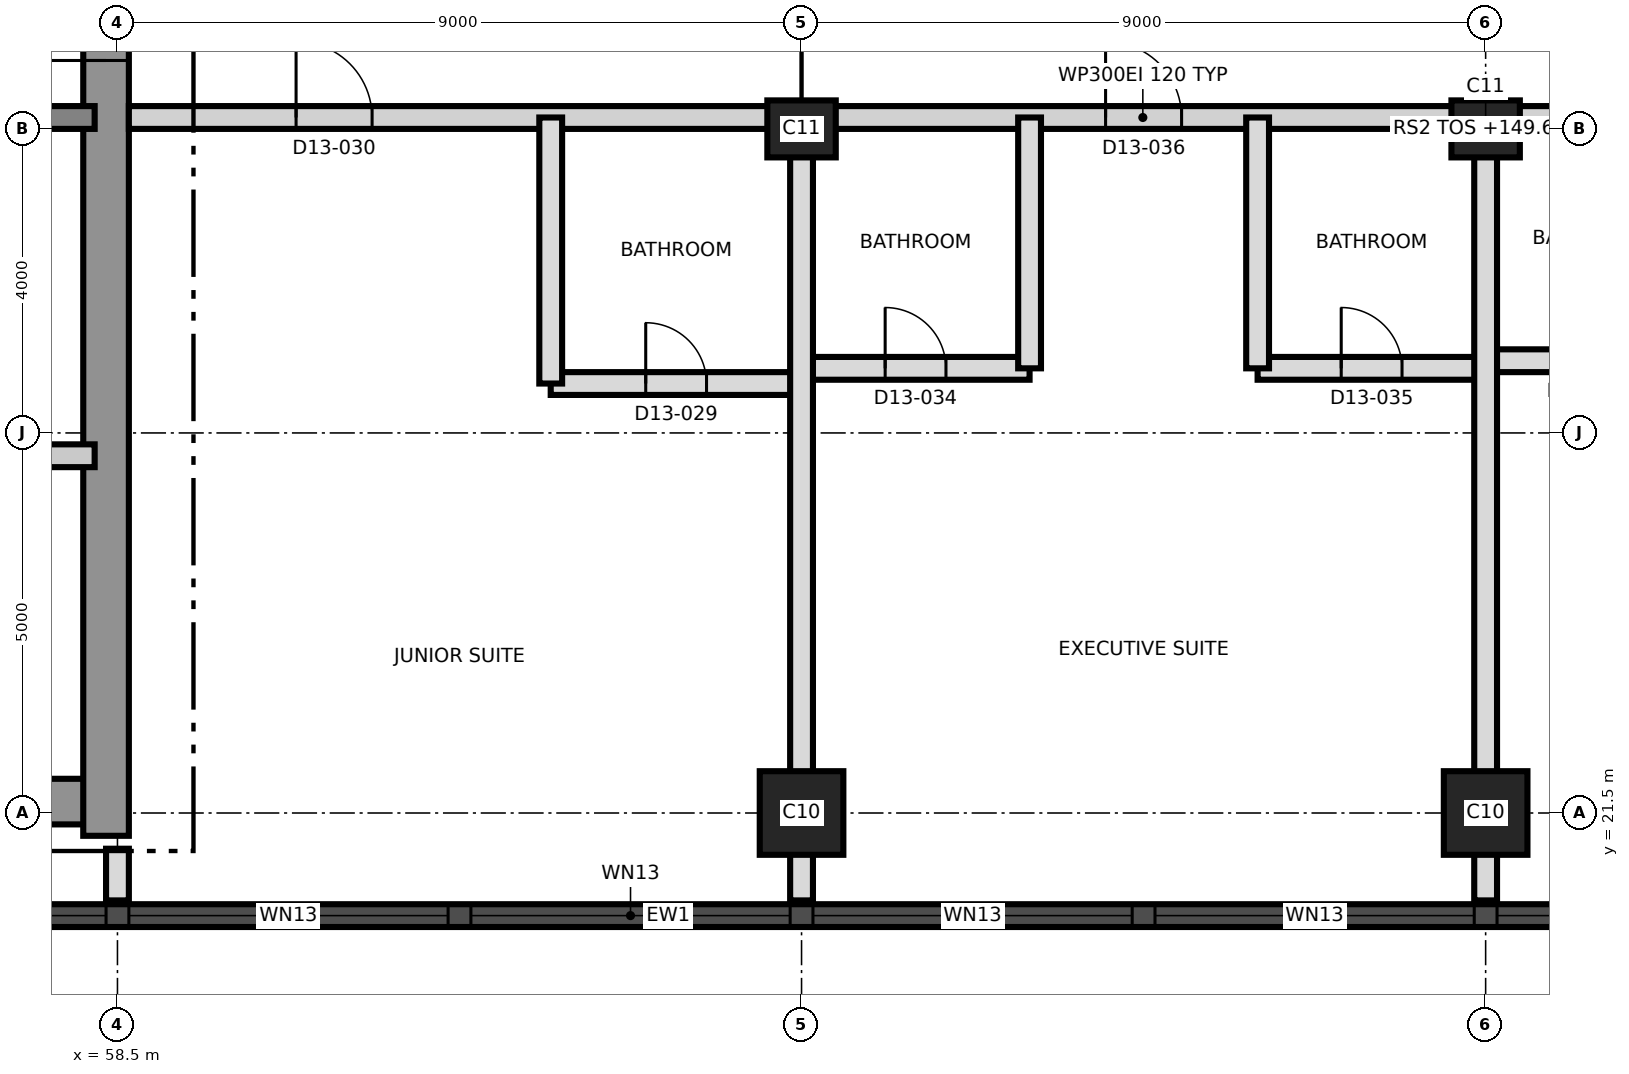
"""IFC4 building model, lengths in metres.
Left out: names, types, materials, properties, quantities, classifications, styles, units other than length and angle.
Written with IfcOpenShell. Run it as: python <this file> out.ifc"""

import sys

from ifc_helpers import new_model, si_unit, direction, frame, frame_2d, origin, origin_2d, place, context, subcontext, project, spatial, rectangle, extrude, element, fill, save


model = new_model("IFC4")
c1 = context("Model", 3, precision=1e-05, world=origin(), true_north=direction((0.0, 1.0)))
c2 = subcontext(c1, "Body", "Model", "MODEL_VIEW")
j1 = project(units=[si_unit("LENGTHUNIT", "METRE"), si_unit("PLANEANGLEUNIT", "RADIAN")], contexts=[c1])
p1 = place(None, origin())
s1 = spatial("IfcSite", under=j1, at=p1, CompositionType="ELEMENT")
p2 = place(p1, origin())
s2 = spatial("IfcBuilding", under=s1, at=p2, CompositionType="ELEMENT")
p3 = place(p2, frame((0.0, 0.0, 145.9)))
s3 = spatial("IfcBuildingStorey", under=s2, at=p3, CompositionType="ELEMENT", Elevation=145.9)
p4 = place(p3, frame((31.2, 21.65, 0.0), z_axis=(0.0, 0.0, 1.0), x_axis=(1.0, 0.0, 0.0)))
e1 = element("IfcWall", 1, at=p4, inside=s3, PredefinedType="SHEAR", context=c2, shape_type="SweptSolid", body=[
    extrude(rectangle(XDim=27.0, YDim=0.6, at=frame_2d((13.5, 0.0))), origin(), (0.0, 0.0, 1.0), 3.7),
])
p5 = place(p3, frame((58.35, 21.2, 0.0), z_axis=(0.0, 0.0, 1.0), x_axis=(0.0, 1.0, 0.0)))
e2 = element("IfcWall", 2, at=p5, inside=s3, PredefinedType="SHEAR", context=c2, shape_type="SweptSolid", body=[
    extrude(rectangle(XDim=18.6, YDim=0.6, at=frame_2d((9.3, 0.0))), origin(), (0.0, 0.0, 1.0), 3.7),
])
p6 = place(p5, frame((10.2, 0.0, 0.0)))
e3 = element("IfcOpeningElement", 3, at=p6, cuts=e2, PredefinedType="OPENING", context=c2, shape_type="SweptSolid", body=[
    extrude(rectangle(XDim=1.2, YDim=2.1, at=frame_2d((0.6, 1.05))), frame((0.0, 0.31, 0.0), z_axis=(0.0, -1.0, 0.0), x_axis=(1.0, 0.0, 0.0)), (0.0, 0.0, 1.0), 0.62),
])
p7 = place(p3, frame((31.8, 30.65, 0.0), z_axis=(0.0, 0.0, 1.0), x_axis=(1.0, 0.0, 0.0)))
e4 = element("IfcWall", 4, at=p7, inside=s3, PredefinedType="SHEAR", context=c2, shape_type="SweptSolid", body=[
    extrude(rectangle(XDim=26.4, YDim=0.3, at=frame_2d((13.2, 0.0))), origin(), (0.0, 0.0, 1.0), 3.7),
])
p8 = place(p7, frame((24.7, 0.0, 0.0)))
e5 = element("IfcOpeningElement", 5, at=p8, cuts=e4, PredefinedType="OPENING", context=c2, shape_type="SweptSolid", body=[
    extrude(rectangle(XDim=1.0, YDim=2.1, at=frame_2d((0.5, 1.05))), frame((0.0, 0.16, 0.0), z_axis=(0.0, -1.0, 0.0), x_axis=(1.0, 0.0, 0.0)), (0.0, 0.0, 1.0), 0.32),
])
p9 = place(p7, frame((4.0, 0.0, 0.0)))
e6 = element("IfcOpeningElement", 6, at=p9, cuts=e4, PredefinedType="OPENING", context=c2, shape_type="SweptSolid", body=[
    extrude(rectangle(XDim=1.0, YDim=2.1, at=frame_2d((0.5, 1.05))), frame((0.0, 0.16, 0.0), z_axis=(0.0, -1.0, 0.0), x_axis=(1.0, 0.0, 0.0)), (0.0, 0.0, 1.0), 0.32),
])
for number, where, z_axis, x_axis in (
    (7, (67.5, 21.5, 0.0), (0.0, 0.0, 1.0), (1.0, 0.0, 0.0)),
    (8, (76.5, 21.5, 0.0), (0.0, 0.0, 1.0), (1.0, 0.0, 0.0)),
):
    element("IfcColumn", number, at=place(p3, frame(where, z_axis=z_axis, x_axis=x_axis)), inside=s3, PredefinedType="COLUMN", context=c2, shape_type="SweptSolid", body=[
        extrude(rectangle(XDim=1.1, YDim=1.1, at=origin_2d()), origin(), (0.0, 0.0, 1.0), 3.7),
    ])
for number, where, z_axis, x_axis in (
    (9, (67.5, 30.5, 0.0), (0.0, 0.0, 1.0), (1.0, 0.0, 0.0)),
    (10, (76.5, 30.5, 0.0), (0.0, 0.0, 1.0), (1.0, 0.0, 0.0)),
):
    element("IfcColumn", number, at=place(p3, frame(where, z_axis=z_axis, x_axis=x_axis)), inside=s3, PredefinedType="COLUMN", context=c2, shape_type="SweptSolid", body=[
        extrude(rectangle(XDim=0.9, YDim=0.75, at=origin_2d()), origin(), (0.0, 0.0, 1.0), 3.7),
    ])
p10 = place(p3, frame((44.011, 20.15, 0.0), z_axis=(0.0, 0.0, 1.0), x_axis=(1.0, 0.0, 0.0)))
e11 = element("IfcWall", 11, at=p10, inside=s3, PredefinedType="SOLIDWALL", context=c2, shape_type="SweptSolid", body=[
    extrude(rectangle(XDim=43.476, YDim=0.3, at=frame_2d((21.738, 0.0))), origin(), (0.0, 0.0, 1.0), 3.4),
])
p11 = place(p10, frame((1.845, 0.0, 0.3)))
e12 = element("IfcOpeningElement", 12, at=p11, cuts=e11, PredefinedType="OPENING", context=c2, shape_type="SweptSolid", body=[
    extrude(rectangle(XDim=1.8, YDim=2.4, at=frame_2d((0.9, 1.2))), frame((0.0, 0.16, 0.0), z_axis=(0.0, -1.0, 0.0), x_axis=(1.0, 0.0, 0.0)), (0.0, 0.0, 1.0), 0.32),
])
p12 = place(p10, frame((5.639, 0.0, 0.9)))
e13 = element("IfcOpeningElement", 13, at=p12, cuts=e11, PredefinedType="OPENING", context=c2, shape_type="SweptSolid", body=[
    extrude(rectangle(XDim=4.2, YDim=1.7, at=frame_2d((2.1, 0.85))), frame((0.0, 0.16, 0.0), z_axis=(0.0, -1.0, 0.0), x_axis=(1.0, 0.0, 0.0)), (0.0, 0.0, 1.0), 0.32),
])
p13 = place(p10, frame((10.139, 0.0, 0.9)))
e14 = element("IfcOpeningElement", 14, at=p13, cuts=e11, PredefinedType="OPENING", context=c2, shape_type="SweptSolid", body=[
    extrude(rectangle(XDim=4.2, YDim=1.7, at=frame_2d((2.1, 0.85))), frame((0.0, 0.16, 0.0), z_axis=(0.0, -1.0, 0.0), x_axis=(1.0, 0.0, 0.0)), (0.0, 0.0, 1.0), 0.32),
])
p14 = place(p10, frame((14.639, 0.0, 0.9)))
e15 = element("IfcOpeningElement", 15, at=p14, cuts=e11, PredefinedType="OPENING", context=c2, shape_type="SweptSolid", body=[
    extrude(rectangle(XDim=4.2, YDim=1.7, at=frame_2d((2.1, 0.85))), frame((0.0, 0.16, 0.0), z_axis=(0.0, -1.0, 0.0), x_axis=(1.0, 0.0, 0.0)), (0.0, 0.0, 1.0), 0.32),
])
p15 = place(p10, frame((19.139, 0.0, 0.9)))
e16 = element("IfcOpeningElement", 16, at=p15, cuts=e11, PredefinedType="OPENING", context=c2, shape_type="SweptSolid", body=[
    extrude(rectangle(XDim=4.2, YDim=1.7, at=frame_2d((2.1, 0.85))), frame((0.0, 0.16, 0.0), z_axis=(0.0, -1.0, 0.0), x_axis=(1.0, 0.0, 0.0)), (0.0, 0.0, 1.0), 0.32),
])
p16 = place(p10, frame((23.639, 0.0, 0.9)))
e17 = element("IfcOpeningElement", 17, at=p16, cuts=e11, PredefinedType="OPENING", context=c2, shape_type="SweptSolid", body=[
    extrude(rectangle(XDim=4.2, YDim=1.7, at=frame_2d((2.1, 0.85))), frame((0.0, 0.16, 0.0), z_axis=(0.0, -1.0, 0.0), x_axis=(1.0, 0.0, 0.0)), (0.0, 0.0, 1.0), 0.32),
])
p17 = place(p10, frame((28.139, 0.0, 0.9)))
e18 = element("IfcOpeningElement", 18, at=p17, cuts=e11, PredefinedType="OPENING", context=c2, shape_type="SweptSolid", body=[
    extrude(rectangle(XDim=4.2, YDim=1.7, at=frame_2d((2.1, 0.85))), frame((0.0, 0.16, 0.0), z_axis=(0.0, -1.0, 0.0), x_axis=(1.0, 0.0, 0.0)), (0.0, 0.0, 1.0), 0.32),
])
p18 = place(p10, frame((32.639, 0.0, 0.9)))
e19 = element("IfcOpeningElement", 19, at=p18, cuts=e11, PredefinedType="OPENING", context=c2, shape_type="SweptSolid", body=[
    extrude(rectangle(XDim=4.2, YDim=1.7, at=frame_2d((2.1, 0.85))), frame((0.0, 0.16, 0.0), z_axis=(0.0, -1.0, 0.0), x_axis=(1.0, 0.0, 0.0)), (0.0, 0.0, 1.0), 0.32),
])
p19 = place(p10, frame((37.139, 0.0, 0.9)))
e20 = element("IfcOpeningElement", 20, at=p19, cuts=e11, PredefinedType="OPENING", context=c2, shape_type="SweptSolid", body=[
    extrude(rectangle(XDim=4.2, YDim=1.7, at=frame_2d((2.1, 0.85))), frame((0.0, 0.16, 0.0), z_axis=(0.0, -1.0, 0.0), x_axis=(1.0, 0.0, 0.0)), (0.0, 0.0, 1.0), 0.32),
])
p20 = place(p3, frame((55.8, 26.2, 0.0), z_axis=(0.0, 0.0, 1.0), x_axis=(1.0, 0.0, 0.0)))
e21 = element("IfcWall", 21, at=p20, inside=s3, PredefinedType="PARTITIONING", context=c2, shape_type="SweptSolid", body=[
    extrude(rectangle(XDim=2.4, YDim=0.3, at=frame_2d((1.2, 0.0))), origin(), (0.0, 0.0, 1.0), 3.4),
])
p21 = place(p20, frame((0.75, 0.0, 0.0)))
e22 = element("IfcOpeningElement", 22, at=p21, cuts=e21, PredefinedType="OPENING", context=c2, shape_type="SweptSolid", body=[
    extrude(rectangle(XDim=0.9, YDim=2.1, at=frame_2d((0.45, 1.05))), frame((0.0, 0.16, 0.0), z_axis=(0.0, -1.0, 0.0), x_axis=(1.0, 0.0, 0.0)), (0.0, 0.0, 1.0), 0.32),
])
p22 = place(p3, frame((64.2, 27.15, 0.0), z_axis=(0.0, 0.0, 1.0), x_axis=(1.0, 0.0, 0.0)))
e23 = element("IfcWall", 23, at=p22, inside=s3, PredefinedType="PARTITIONING", context=c2, shape_type="SweptSolid", body=[
    extrude(rectangle(XDim=3.3, YDim=0.3, at=frame_2d((1.65, 0.0))), origin(), (0.0, 0.0, 1.0), 3.3),
])
p23 = place(p22, frame((1.25, 0.0, 0.0)))
e24 = element("IfcOpeningElement", 24, at=p23, cuts=e23, PredefinedType="OPENING", context=c2, shape_type="SweptSolid", body=[
    extrude(rectangle(XDim=0.8, YDim=2.1, at=frame_2d((0.4, 1.05))), frame((0.0, 0.16, 0.0), z_axis=(0.0, -1.0, 0.0), x_axis=(1.0, 0.0, 0.0)), (0.0, 0.0, 1.0), 0.32),
])
p24 = place(p3, frame((67.5, 27.35, 0.0), z_axis=(0.0, 0.0, 1.0), x_axis=(1.0, 0.0, 0.0)))
e25 = element("IfcWall", 25, at=p24, inside=s3, PredefinedType="PARTITIONING", context=c2, shape_type="SweptSolid", body=[
    extrude(rectangle(XDim=3.0, YDim=0.3, at=frame_2d((1.5, 0.0))), origin(), (0.0, 0.0, 1.0), 3.3),
])
p25 = place(p24, frame((1.1, 0.0, 0.0)))
e26 = element("IfcOpeningElement", 26, at=p25, cuts=e25, PredefinedType="OPENING", context=c2, shape_type="SweptSolid", body=[
    extrude(rectangle(XDim=0.8, YDim=2.1, at=frame_2d((0.4, 1.05))), frame((0.0, 0.16, 0.0), z_axis=(0.0, -1.0, 0.0), x_axis=(1.0, 0.0, 0.0)), (0.0, 0.0, 1.0), 0.32),
])
p26 = place(p3, frame((73.5, 27.35, 0.0), z_axis=(0.0, 0.0, 1.0), x_axis=(1.0, 0.0, 0.0)))
e27 = element("IfcWall", 27, at=p26, inside=s3, PredefinedType="PARTITIONING", context=c2, shape_type="SweptSolid", body=[
    extrude(rectangle(XDim=3.0, YDim=0.3, at=frame_2d((1.5, 0.0))), origin(), (0.0, 0.0, 1.0), 3.3),
])
p27 = place(p26, frame((1.1, 0.0, 0.0)))
e28 = element("IfcOpeningElement", 28, at=p27, cuts=e27, PredefinedType="OPENING", context=c2, shape_type="SweptSolid", body=[
    extrude(rectangle(XDim=0.8, YDim=2.1, at=frame_2d((0.4, 1.05))), frame((0.0, 0.16, 0.0), z_axis=(0.0, -1.0, 0.0), x_axis=(1.0, 0.0, 0.0)), (0.0, 0.0, 1.0), 0.32),
])
p28 = place(p3, frame((76.5, 27.45, 0.0), z_axis=(0.0, 0.0, 1.0), x_axis=(1.0, 0.0, 0.0)))
e29 = element("IfcWall", 29, at=p28, inside=s3, PredefinedType="PARTITIONING", context=c2, shape_type="SweptSolid", body=[
    extrude(rectangle(XDim=2.7, YDim=0.3, at=frame_2d((1.35, 0.0))), origin(), (0.0, 0.0, 1.0), 3.3),
])
p29 = place(p28, frame((0.95, 0.0, 0.0)))
e30 = element("IfcOpeningElement", 30, at=p29, cuts=e29, PredefinedType="OPENING", context=c2, shape_type="SweptSolid", body=[
    extrude(rectangle(XDim=0.8, YDim=2.1, at=frame_2d((0.4, 1.05))), frame((0.0, 0.16, 0.0), z_axis=(0.0, -1.0, 0.0), x_axis=(1.0, 0.0, 0.0)), (0.0, 0.0, 1.0), 0.32),
])
p30 = place(p3, frame((58.65, 30.65, 0.0), z_axis=(0.0, 0.0, 1.0), x_axis=(1.0, 0.0, 0.0)))
e31 = element("IfcWall", 31, at=p30, inside=s3, PredefinedType="PARTITIONING", context=c2, shape_type="SweptSolid", body=[
    extrude(rectangle(XDim=26.68, YDim=0.3, at=frame_2d((13.34, 0.0))), origin(), (0.0, 0.0, 1.0), 3.3),
])
p31 = place(p30, frame((2.2, 0.0, 0.0)))
e32 = element("IfcOpeningElement", 32, at=p31, cuts=e31, PredefinedType="OPENING", context=c2, shape_type="SweptSolid", body=[
    extrude(rectangle(XDim=1.0, YDim=2.4, at=frame_2d((0.5, 1.2))), frame((0.0, 0.16, 0.0), z_axis=(0.0, -1.0, 0.0), x_axis=(1.0, 0.0, 0.0)), (0.0, 0.0, 1.0), 0.32),
])
p32 = place(p30, frame((12.85, 0.0, 0.0)))
e33 = element("IfcOpeningElement", 33, at=p32, cuts=e31, PredefinedType="OPENING", context=c2, shape_type="SweptSolid", body=[
    extrude(rectangle(XDim=1.0, YDim=2.4, at=frame_2d((0.5, 1.2))), frame((0.0, 0.16, 0.0), z_axis=(0.0, -1.0, 0.0), x_axis=(1.0, 0.0, 0.0)), (0.0, 0.0, 1.0), 0.32),
])
p33 = place(p30, frame((20.77, 0.0, 0.0)))
e34 = element("IfcOpeningElement", 34, at=p33, cuts=e31, PredefinedType="OPENING", context=c2, shape_type="SweptSolid", body=[
    extrude(rectangle(XDim=1.0, YDim=2.1, at=frame_2d((0.5, 1.05))), frame((0.0, 0.16, 0.0), z_axis=(0.0, -1.0, 0.0), x_axis=(1.0, 0.0, 0.0)), (0.0, 0.0, 1.0), 0.32),
])
p34 = place(p30, frame((22.57, 0.0, 0.0)))
e35 = element("IfcOpeningElement", 35, at=p34, cuts=e31, PredefinedType="OPENING", context=c2, shape_type="SweptSolid", body=[
    extrude(rectangle(XDim=1.0, YDim=2.1, at=frame_2d((0.5, 1.05))), frame((0.0, 0.16, 0.0), z_axis=(0.0, -1.0, 0.0), x_axis=(1.0, 0.0, 0.0)), (0.0, 0.0, 1.0), 0.32),
])
p35 = place(p3, frame((58.5, 20.35, 0.0), z_axis=(0.0, 0.0, 1.0), x_axis=(0.0, 1.0, 0.0)))
e36 = element("IfcWall", 36, at=p35, inside=s3, PredefinedType="PARTITIONING", context=c2, shape_type="SweptSolid", body=[
    extrude(rectangle(XDim=0.68, YDim=0.3, at=frame_2d((0.34, 0.0))), origin(), (0.0, 0.0, 1.0), 3.4),
])
p36 = place(p3, frame((64.2, 27.15, 0.0), z_axis=(0.0, 0.0, 1.0), x_axis=(0.0, 1.0, 0.0)))
e37 = element("IfcWall", 37, at=p36, inside=s3, PredefinedType="PARTITIONING", context=c2, shape_type="SweptSolid", body=[
    extrude(rectangle(XDim=3.5, YDim=0.3, at=frame_2d((1.75, 0.0))), origin(), (0.0, 0.0, 1.0), 3.4),
])
p37 = place(p3, frame((67.5, 20.35, 0.0), z_axis=(0.0, 0.0, 1.0), x_axis=(0.0, 1.0, 0.0)))
e38 = element("IfcWall", 38, at=p37, inside=s3, PredefinedType="PARTITIONING", context=c2, shape_type="SweptSolid", body=[
    extrude(rectangle(XDim=10.3, YDim=0.3, at=frame_2d((5.15, 0.0))), origin(), (0.0, 0.0, 1.0), 3.3),
])
for number, where, z_axis, x_axis in (
    (39, (70.5, 27.35, 0.0), (0.0, 0.0, 1.0), (0.0, 1.0, 0.0)),
    (40, (73.5, 27.35, 0.0), (0.0, 0.0, 1.0), (0.0, 1.0, 0.0)),
):
    element("IfcWall", number, at=place(p3, frame(where, z_axis=z_axis, x_axis=x_axis)), inside=s3, PredefinedType="PARTITIONING", context=c2, shape_type="SweptSolid", body=[
        extrude(rectangle(XDim=3.3, YDim=0.3, at=frame_2d((1.65, 0.0))), origin(), (0.0, 0.0, 1.0), 3.3),
    ])
p38 = place(p3, frame((76.5, 20.35, 0.0), z_axis=(0.0, 0.0, 1.0), x_axis=(0.0, 1.0, 0.0)))
e41 = element("IfcWall", 41, at=p38, inside=s3, PredefinedType="PARTITIONING", context=c2, shape_type="SweptSolid", body=[
    extrude(rectangle(XDim=10.3, YDim=0.3, at=frame_2d((5.15, 0.0))), origin(), (0.0, 0.0, 1.0), 3.3),
])
p39 = place(p13, origin())
e42 = element("IfcWindow", 42, at=p39, inside=s3, PartitioningType="SINGLE_PANEL", PredefinedType="WINDOW", context=c2, shape_type="SweptSolid", body=[
    extrude(rectangle(XDim=4.2, YDim=1.7, at=frame_2d((2.1, 0.85))), frame((0.0, 0.03, 0.0), z_axis=(0.0, -1.0, 0.0), x_axis=(1.0, 0.0, 0.0)), (0.0, 0.0, 1.0), 0.06),
])
fill(e14, e42)
p40 = place(p14, origin())
e43 = element("IfcWindow", 43, at=p40, inside=s3, PartitioningType="SINGLE_PANEL", PredefinedType="WINDOW", context=c2, shape_type="SweptSolid", body=[
    extrude(rectangle(XDim=4.2, YDim=1.7, at=frame_2d((2.1, 0.85))), frame((0.0, 0.03, 0.0), z_axis=(0.0, -1.0, 0.0), x_axis=(1.0, 0.0, 0.0)), (0.0, 0.0, 1.0), 0.06),
])
fill(e15, e43)
p41 = place(p15, origin())
e44 = element("IfcWindow", 44, at=p41, inside=s3, PartitioningType="SINGLE_PANEL", PredefinedType="WINDOW", context=c2, shape_type="SweptSolid", body=[
    extrude(rectangle(XDim=4.2, YDim=1.7, at=frame_2d((2.1, 0.85))), frame((0.0, 0.03, 0.0), z_axis=(0.0, -1.0, 0.0), x_axis=(1.0, 0.0, 0.0)), (0.0, 0.0, 1.0), 0.06),
])
fill(e16, e44)
p42 = place(p16, origin())
e45 = element("IfcWindow", 45, at=p42, inside=s3, PartitioningType="SINGLE_PANEL", PredefinedType="WINDOW", context=c2, shape_type="SweptSolid", body=[
    extrude(rectangle(XDim=4.2, YDim=1.7, at=frame_2d((2.1, 0.85))), frame((0.0, 0.03, 0.0), z_axis=(0.0, -1.0, 0.0), x_axis=(1.0, 0.0, 0.0)), (0.0, 0.0, 1.0), 0.06),
])
fill(e17, e45)
p43 = place(p17, origin())
e46 = element("IfcWindow", 46, at=p43, inside=s3, PartitioningType="SINGLE_PANEL", PredefinedType="WINDOW", context=c2, shape_type="SweptSolid", body=[
    extrude(rectangle(XDim=4.2, YDim=1.7, at=frame_2d((2.1, 0.85))), frame((0.0, 0.03, 0.0), z_axis=(0.0, -1.0, 0.0), x_axis=(1.0, 0.0, 0.0)), (0.0, 0.0, 1.0), 0.06),
])
fill(e18, e46)
p44 = place(p18, origin())
e47 = element("IfcWindow", 47, at=p44, inside=s3, PartitioningType="SINGLE_PANEL", PredefinedType="WINDOW", context=c2, shape_type="SweptSolid", body=[
    extrude(rectangle(XDim=4.2, YDim=1.7, at=frame_2d((2.1, 0.85))), frame((0.0, 0.03, 0.0), z_axis=(0.0, -1.0, 0.0), x_axis=(1.0, 0.0, 0.0)), (0.0, 0.0, 1.0), 0.06),
])
fill(e19, e47)
p45 = place(p6, origin())
e48 = element("IfcDoor", 48, at=p45, inside=s3, OperationType="SINGLE_SWING_LEFT", PredefinedType="DOOR", context=c2, shape_type="SweptSolid", body=[
    extrude(rectangle(XDim=1.2, YDim=2.1, at=frame_2d((0.6, 1.05))), frame((0.0, 0.025, 0.0), z_axis=(0.0, -1.0, 0.0), x_axis=(1.0, 0.0, 0.0)), (0.0, 0.0, 1.0), 0.05),
])
fill(e3, e48)
p46 = place(p23, origin())
e49 = element("IfcDoor", 49, at=p46, inside=s3, OperationType="SINGLE_SWING_LEFT", PredefinedType="DOOR", context=c2, shape_type="SweptSolid", body=[
    extrude(rectangle(XDim=0.8, YDim=2.1, at=frame_2d((0.4, 1.05))), frame((0.0, 0.025, 0.0), z_axis=(0.0, -1.0, 0.0), x_axis=(1.0, 0.0, 0.0)), (0.0, 0.0, 1.0), 0.05),
])
fill(e24, e49)
p47 = place(p31, origin())
e50 = element("IfcDoor", 50, at=p47, inside=s3, OperationType="SINGLE_SWING_LEFT", PredefinedType="DOOR", context=c2, shape_type="SweptSolid", body=[
    extrude(rectangle(XDim=1.0, YDim=2.4, at=frame_2d((0.5, 1.2))), frame((0.0, 0.025, 0.0), z_axis=(0.0, -1.0, 0.0), x_axis=(1.0, 0.0, 0.0)), (0.0, 0.0, 1.0), 0.05),
])
fill(e32, e50)
p48 = place(p25, origin())
e51 = element("IfcDoor", 51, at=p48, inside=s3, OperationType="SINGLE_SWING_LEFT", PredefinedType="DOOR", context=c2, shape_type="SweptSolid", body=[
    extrude(rectangle(XDim=0.8, YDim=2.1, at=frame_2d((0.4, 1.05))), frame((0.0, 0.025, 0.0), z_axis=(0.0, -1.0, 0.0), x_axis=(1.0, 0.0, 0.0)), (0.0, 0.0, 1.0), 0.05),
])
fill(e26, e51)
p49 = place(p27, origin())
e52 = element("IfcDoor", 52, at=p49, inside=s3, OperationType="SINGLE_SWING_LEFT", PredefinedType="DOOR", context=c2, shape_type="SweptSolid", body=[
    extrude(rectangle(XDim=0.8, YDim=2.1, at=frame_2d((0.4, 1.05))), frame((0.0, 0.025, 0.0), z_axis=(0.0, -1.0, 0.0), x_axis=(1.0, 0.0, 0.0)), (0.0, 0.0, 1.0), 0.05),
])
fill(e28, e52)
p50 = place(p32, origin())
e53 = element("IfcDoor", 53, at=p50, inside=s3, OperationType="SINGLE_SWING_RIGHT", PredefinedType="DOOR", context=c2, shape_type="SweptSolid", body=[
    extrude(rectangle(XDim=1.0, YDim=2.4, at=frame_2d((0.5, 1.2))), frame((0.0, 0.025, 0.0), z_axis=(0.0, -1.0, 0.0), x_axis=(1.0, 0.0, 0.0)), (0.0, 0.0, 1.0), 0.05),
])
fill(e33, e53)
save(model, sys.argv[1])
